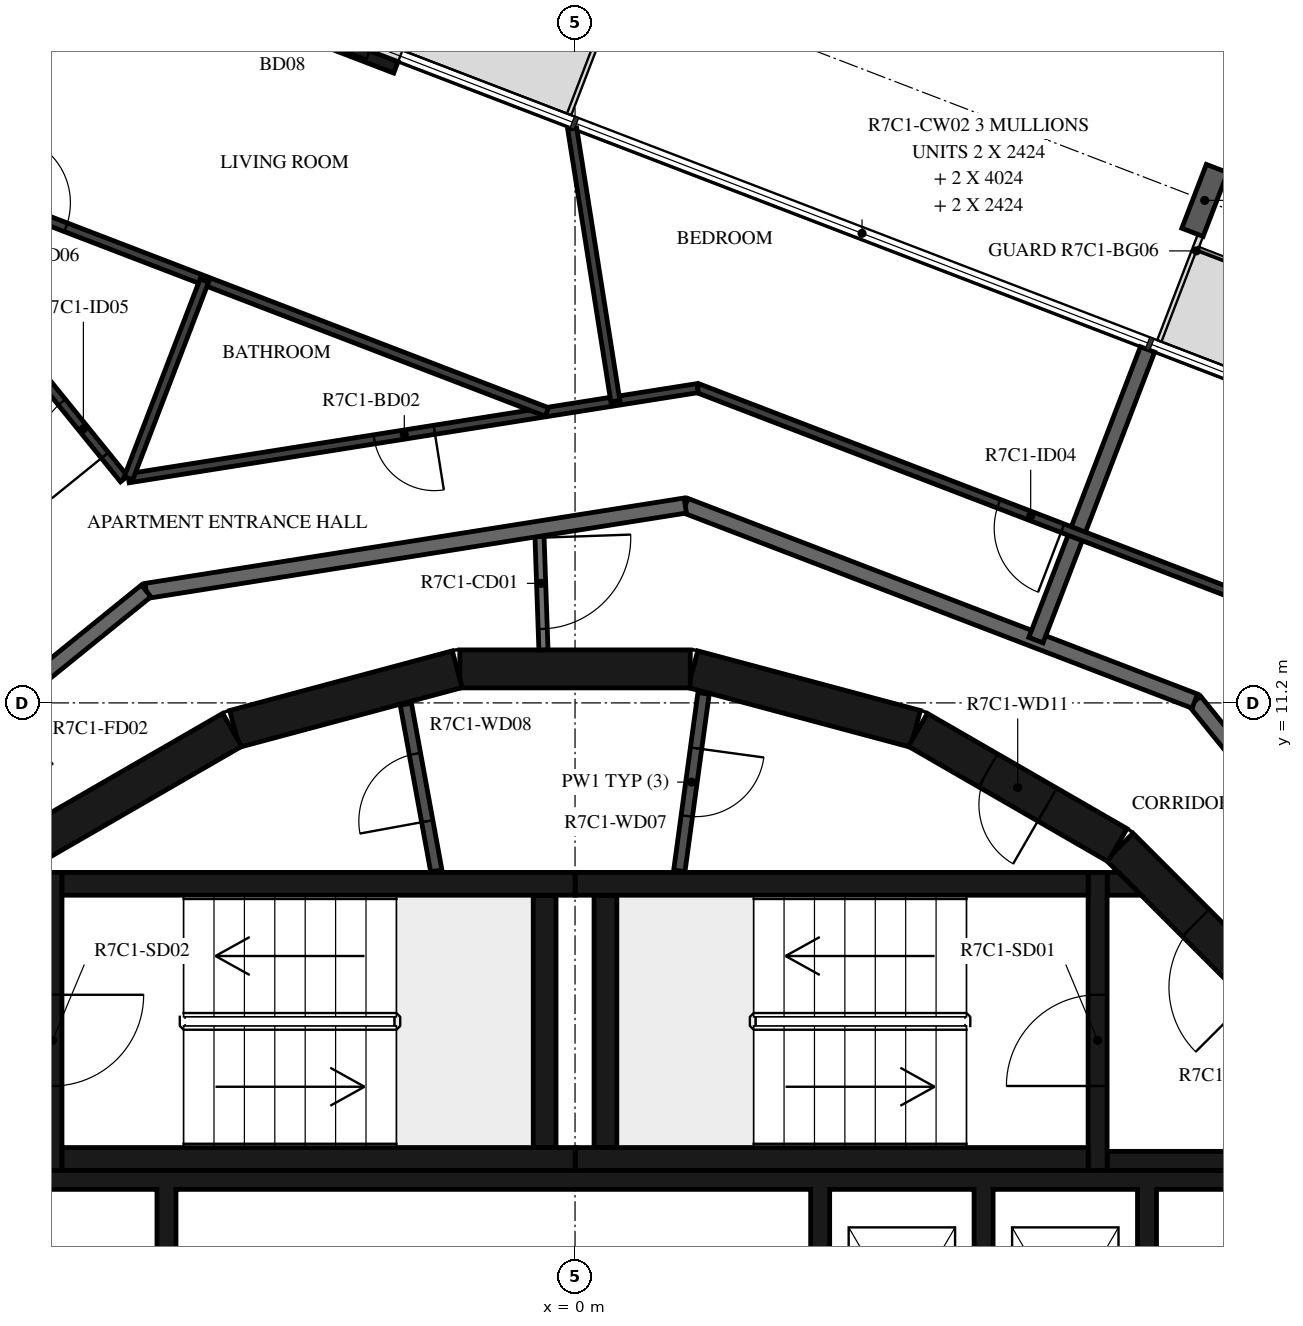
"""IFC4 building model, lengths in metres.
Left out: names, types, materials, properties, quantities, classifications, styles, units other than length and angle.
Written with IfcOpenShell. Run it as: python <this file> out.ifc"""

import sys

from ifc_helpers import new_model, si_unit, direction, frame, frame_2d, origin, origin_2d, place, context, subcontext, project, spatial, polyline, rectangle, i_section, outline, extrude, element, fill, save


model = new_model("IFC4")
c1 = context("Model", 3, precision=1e-05, world=origin(), true_north=direction((0.0, 1.0)))
c2 = subcontext(c1, "Body", "Model", "MODEL_VIEW")
j1 = project(units=[si_unit("LENGTHUNIT", "METRE"), si_unit("PLANEANGLEUNIT", "RADIAN")], contexts=[c1])
p1 = place(None, origin())
s1 = spatial("IfcSite", under=j1, at=p1, CompositionType="ELEMENT")
p2 = place(p1, origin())
s2 = spatial("IfcBuilding", under=s1, at=p2, CompositionType="ELEMENT")
p3 = place(p2, frame((0.0, 0.0, 287.9)))
s3 = spatial("IfcBuildingStorey", under=s2, at=p3, CompositionType="ELEMENT", Elevation=287.9)
p4 = place(p3, frame((8.284, 17.811, -0.38), z_axis=(0.0, 0.0, 1.0), x_axis=(0.933580354843, -0.35836813621, 0.0)))
e1 = element("IfcColumn", 1, at=p4, inside=s3, PredefinedType="COLUMN", context=c2, shape_type="SweptSolid", body=[
    extrude(i_section(OverallWidth=0.3, OverallDepth=0.9, WebThickness=0.019, FlangeThickness=0.035, FilletRadius=0.03, at=origin_2d()), origin(), (0.0, 0.0, 1.0), 2.616),
])
p5 = place(p3, frame((-2.357, 19.56, 0.0), z_axis=(0.0, 0.0, 1.0), x_axis=(-0.933553885508, 0.358437083534, 0.0)))
e2 = element("IfcWall", 2, at=p5, inside=s3, PredefinedType="STANDARD", context=c2, shape_type="SweptSolid", body=[
    extrude(rectangle(XDim=3.2, YDim=0.16, at=frame_2d((1.6, 0.0))), origin(), (0.0, 0.0, 1.0), 3.05),
])
p6 = place(p5, frame((0.4, 0.0, 0.0)))
e3 = element("IfcOpeningElement", 3, at=p6, cuts=e2, PredefinedType="OPENING", context=c2, shape_type="SweptSolid", body=[
    extrude(rectangle(XDim=2.4, YDim=2.4, at=frame_2d((1.2, 1.2))), frame((0.0, 0.09, 0.0), z_axis=(0.0, -1.0, 0.0), x_axis=(1.0, 0.0, 0.0)), (0.0, 0.0, 1.0), 0.18),
])
p7 = place(p3, frame((9.308, 7.164, 0.0), z_axis=(0.0, 0.0, 1.0), x_axis=(-0.707106781187, 0.707106781187, 0.0)))
e4 = element("IfcWall", 4, at=p7, inside=s3, PredefinedType="SHEAR", context=c2, shape_type="SweptSolid", body=[
    extrude(rectangle(XDim=3.032, YDim=0.5, at=frame_2d((1.516, 0.0))), origin(), (0.0, 0.0, 1.0), 3.05),
])
p8 = place(p7, frame((0.416, 0.0, 0.0)))
e5 = element("IfcOpeningElement", 5, at=p8, cuts=e4, PredefinedType="OPENING", context=c2, shape_type="SweptSolid", body=[
    extrude(rectangle(XDim=1.2, YDim=2.1, at=frame_2d((0.6, 1.05))), frame((0.0, 0.26, 0.0), z_axis=(0.0, -1.0, 0.0), x_axis=(1.0, 0.0, 0.0)), (0.0, 0.0, 1.0), 0.52),
])
p9 = place(p3, frame((7.137, 9.329, 0.0), z_axis=(0.0, 0.0, 1.0), x_axis=(-0.865975092491, 0.500087131594, 0.0)))
e6 = element("IfcWall", 6, at=p9, inside=s3, PredefinedType="SHEAR", context=c2, shape_type="SweptSolid", body=[
    extrude(rectangle(XDim=3.033, YDim=0.5, at=frame_2d((1.516, 0.0))), origin(), (0.0, 0.0, 1.0), 3.05),
])
p10 = place(p9, frame((1.066, 0.0, 0.0)))
e7 = element("IfcOpeningElement", 7, at=p10, cuts=e6, PredefinedType="OPENING", context=c2, shape_type="SweptSolid", body=[
    extrude(rectangle(XDim=0.9, YDim=2.1, at=frame_2d((0.45, 1.05))), frame((0.0, 0.26, 0.0), z_axis=(0.0, -1.0, 0.0), x_axis=(1.0, 0.0, 0.0)), (0.0, 0.0, 1.0), 0.52),
])
for number, where, z_axis, x_axis in (
    (8, (4.479, 10.858, 0.0), (0.0, 0.0, 1.0), (-0.966, 0.259, 0.0)),
    (9, (1.516, 11.647, 0.0), (0.0, 0.0, 1.0), (-1.0, 0.0, 0.0)),
    (10, (-1.55, 11.643, 0.0), (0.0, 0.0, 1.0), (-0.966, -0.259, 0.0)),
    (11, (-4.51, 10.845, 0.0), (0.0, 0.0, 1.0), (-0.866, -0.5, 0.0)),
):
    element("IfcWall", number, at=place(p3, frame(where, z_axis=z_axis, x_axis=x_axis)), inside=s3, PredefinedType="SHEAR", context=c2, shape_type="SweptSolid", body=[
        extrude(rectangle(XDim=3.033, YDim=0.5, at=frame_2d((1.516, 0.0))), origin(), (0.0, 0.0, 1.0), 3.05),
    ])
for number, where, z_axis, x_axis in (
    (12, (0.0, 5.2, 0.0), (0.0, 0.0, 1.0), (1.0, 0.0, 0.0)),
    (13, (0.0, 8.82, 0.0), (0.0, 0.0, 1.0), (1.0, 0.0, 0.0)),
):
    element("IfcWall", number, at=place(p3, frame(where, z_axis=z_axis, x_axis=x_axis)), inside=s3, PredefinedType="SHEAR", context=c2, shape_type="SweptSolid", body=[
        extrude(rectangle(XDim=6.75, YDim=0.3, at=frame_2d((3.375, 0.0))), origin(), (0.0, 0.0, 1.0), 3.05),
    ])
p11 = place(p3, frame((0.4, 5.35, 0.0), z_axis=(0.0, 0.0, 1.0), x_axis=(0.0, 1.0, 0.0)))
e14 = element("IfcWall", 14, at=p11, inside=s3, PredefinedType="SHEAR", context=c2, shape_type="SweptSolid", body=[
    extrude(rectangle(XDim=3.32, YDim=0.3, at=frame_2d((1.66, 0.0))), origin(), (0.0, 0.0, 1.0), 3.05),
])
p12 = place(p3, frame((6.875, 5.05, 0.0), z_axis=(0.0, 0.0, 1.0), x_axis=(0.0, 1.0, 0.0)))
e15 = element("IfcWall", 15, at=p12, inside=s3, PredefinedType="SHEAR", context=c2, shape_type="SweptSolid", body=[
    extrude(rectangle(XDim=3.92, YDim=0.25, at=frame_2d((1.96, 0.0))), origin(), (0.0, 0.0, 1.0), 3.05),
])
p13 = place(p12, frame((1.11, 0.0, 0.0)))
e16 = element("IfcOpeningElement", 16, at=p13, cuts=e15, PredefinedType="OPENING", context=c2, shape_type="SweptSolid", body=[
    extrude(rectangle(XDim=1.2, YDim=2.1, at=frame_2d((0.6, 1.05))), frame((0.0, 0.135, 0.0), z_axis=(0.0, -1.0, 0.0), x_axis=(1.0, 0.0, 0.0)), (0.0, 0.0, 1.0), 0.27),
])
p14 = place(p3, frame((7.0, 5.175, 0.0), z_axis=(0.0, 0.0, 1.0), x_axis=(1.0, 0.0, 0.0)))
e17 = element("IfcWall", 17, at=p14, inside=s3, PredefinedType="SHEAR", context=c2, shape_type="SweptSolid", body=[
    extrude(rectangle(XDim=3.1, YDim=0.25, at=frame_2d((1.55, 0.0))), origin(), (0.0, 0.0, 1.0), 3.05),
])
p15 = place(p3, origin())
e18 = element("IfcWall", 18, at=p15, inside=s3, PredefinedType="SHEAR", context=c2, shape_type="SweptSolid", body=[
    extrude(outline(polyline([(7.448, 8.67), (7.0, 8.67), (7.0, 8.97), (7.148, 8.97), (7.448, 8.67)])), origin(), (0.0, 0.0, 1.0), 3.05),
])
for number, where, z_axis, x_axis in (
    (19, (-6.75, 5.2, 0.0), (0.0, 0.0, 1.0), (1.0, 0.0, 0.0)),
    (20, (-6.75, 8.82, 0.0), (0.0, 0.0, 1.0), (1.0, 0.0, 0.0)),
):
    element("IfcWall", number, at=place(p3, frame(where, z_axis=z_axis, x_axis=x_axis)), inside=s3, PredefinedType="SHEAR", context=c2, shape_type="SweptSolid", body=[
        extrude(rectangle(XDim=6.75, YDim=0.3, at=frame_2d((3.375, 0.0))), origin(), (0.0, 0.0, 1.0), 3.05),
    ])
p16 = place(p3, frame((-0.4, 5.35, 0.0), z_axis=(0.0, 0.0, 1.0), x_axis=(0.0, 1.0, 0.0)))
e21 = element("IfcWall", 21, at=p16, inside=s3, PredefinedType="SHEAR", context=c2, shape_type="SweptSolid", body=[
    extrude(rectangle(XDim=3.32, YDim=0.3, at=frame_2d((1.66, 0.0))), origin(), (0.0, 0.0, 1.0), 3.05),
])
p17 = place(p3, frame((-6.875, 8.97, 0.0), z_axis=(0.0, 0.0, 1.0), x_axis=(0.0, -1.0, 0.0)))
e22 = element("IfcWall", 22, at=p17, inside=s3, PredefinedType="SHEAR", context=c2, shape_type="SweptSolid", body=[
    extrude(rectangle(XDim=3.92, YDim=0.25, at=frame_2d((1.96, 0.0))), origin(), (0.0, 0.0, 1.0), 3.05),
])
p18 = place(p17, frame((1.61, 0.0, 0.0)))
e23 = element("IfcOpeningElement", 23, at=p18, cuts=e22, PredefinedType="OPENING", context=c2, shape_type="SweptSolid", body=[
    extrude(rectangle(XDim=1.2, YDim=2.1, at=frame_2d((0.6, 1.05))), frame((0.0, 0.135, 0.0), z_axis=(0.0, -1.0, 0.0), x_axis=(1.0, 0.0, 0.0)), (0.0, 0.0, 1.0), 0.27),
])
p19 = place(p3, origin())
e24 = element("IfcWall", 24, at=p19, inside=s3, PredefinedType="SHEAR", context=c2, shape_type="SweptSolid", body=[
    extrude(outline(polyline([(-9.8, 1.9), (-9.55, 1.9), (-9.55, 4.8), (-5.5, 4.8), (-5.5, 1.9), (-5.25, 1.9), (-5.25, 4.8), (3.1, 4.8), (3.1, 1.9), (3.35, 1.9), (3.35, 4.8), (5.25, 4.8), (5.25, 1.9), (5.5, 1.9), (5.5, 4.8), (7.4, 4.8), (7.4, 1.9), (7.65, 1.9), (7.65, 4.8), (9.55, 4.8), (9.55, 1.9), (9.8, 1.9), (9.8, 4.8), (9.8, 5.05), (-9.8, 5.05), (-9.8, 4.8), (-9.8, 1.9)])), origin(), (0.0, 0.0, 1.0), 3.05),
])
p20 = place(p3, frame((1.691, 11.326, 0.0), z_axis=(0.0, 0.0, 1.0), x_axis=(-0.135344253201, -0.990798633994, 0.0)))
e25 = element("IfcWall", 25, at=p20, inside=s3, PredefinedType="PARTITIONING", context=c2, shape_type="SweptSolid", body=[
    extrude(rectangle(XDim=2.358, YDim=0.15, at=frame_2d((1.179, 0.0))), origin(), (0.0, 0.0, 1.0), 3.05),
])
p21 = place(p20, frame((0.729, 0.0, 0.0)))
e26 = element("IfcOpeningElement", 26, at=p21, cuts=e25, PredefinedType="OPENING", context=c2, shape_type="SweptSolid", body=[
    extrude(rectangle(XDim=0.9, YDim=2.1, at=frame_2d((0.45, 1.05))), frame((0.0, 0.085, 0.0), z_axis=(0.0, -1.0, 0.0), x_axis=(1.0, 0.0, 0.0)), (0.0, 0.0, 1.0), 0.17),
])
p22 = place(p3, frame((-1.825, 8.99, 0.0), z_axis=(0.0, 0.0, 1.0), x_axis=(-0.179955206115, 0.983674805915, 0.0)))
e27 = element("IfcWall", 27, at=p22, inside=s3, PredefinedType="PARTITIONING", context=c2, shape_type="SweptSolid", body=[
    extrude(rectangle(XDim=2.229, YDim=0.15, at=frame_2d((1.115, 0.0))), origin(), (0.0, 0.0, 1.0), 3.05),
])
p23 = place(p22, frame((0.665, 0.0, 0.0)))
e28 = element("IfcOpeningElement", 28, at=p23, cuts=e27, PredefinedType="OPENING", context=c2, shape_type="SweptSolid", body=[
    extrude(rectangle(XDim=0.9, YDim=2.1, at=frame_2d((0.45, 1.05))), frame((0.0, 0.085, 0.0), z_axis=(0.0, -1.0, 0.0), x_axis=(1.0, 0.0, 0.0)), (0.0, 0.0, 1.0), 0.17),
])
p24 = place(p3, frame((-0.471, 13.492, 0.0), z_axis=(0.0, 0.0, 1.0), x_axis=(0.034873173869, -0.999391745886, 0.0)))
e29 = element("IfcWall", 29, at=p24, inside=s3, PredefinedType="PARTITIONING", context=c2, shape_type="SweptSolid", body=[
    extrude(rectangle(XDim=1.596, YDim=0.12, at=frame_2d((0.798, 0.0))), origin(), (0.0, 0.0, 1.0), 3.05),
])
p25 = place(p24, frame((0.12, 0.0, 0.0)))
e30 = element("IfcOpeningElement", 30, at=p25, cuts=e29, PredefinedType="OPENING", context=c2, shape_type="SweptSolid", body=[
    extrude(rectangle(XDim=1.2, YDim=2.1, at=frame_2d((0.6, 1.05))), frame((0.0, 0.07, 0.0), z_axis=(0.0, -1.0, 0.0), x_axis=(1.0, 0.0, 0.0)), (0.0, 0.0, 1.0), 0.14),
])
p26 = place(p3, frame((12.673, 5.643, 0.0), z_axis=(0.0, 0.0, 1.0), x_axis=(-0.629302871585, 0.777160148113, 0.0)))
e31 = element("IfcWall", 31, at=p26, inside=s3, PredefinedType="STANDARD", context=c2, shape_type="SweptSolid", body=[
    extrude(rectangle(XDim=7.181, YDim=0.2, at=frame_2d((3.59, 0.0))), origin(), (0.0, 0.0, 1.0), 3.05),
])
p27 = place(p26, frame((4.1, 0.0, 0.0)))
e32 = element("IfcOpeningElement", 32, at=p27, cuts=e31, PredefinedType="OPENING", context=c2, shape_type="SweptSolid", body=[
    extrude(rectangle(XDim=1.0, YDim=2.1, at=frame_2d((0.5, 1.05))), frame((0.0, 0.11, 0.0), z_axis=(0.0, -1.0, 0.0), x_axis=(1.0, 0.0, 0.0)), (0.0, 0.0, 1.0), 0.22),
])
p28 = place(p3, frame((8.154, 11.223, 0.0), z_axis=(0.0, 0.0, 1.0), x_axis=(-0.93359073609, 0.358341090983, 0.0)))
e33 = element("IfcWall", 33, at=p28, inside=s3, PredefinedType="STANDARD", context=c2, shape_type="SweptSolid", body=[
    extrude(rectangle(XDim=7.181, YDim=0.2, at=frame_2d((3.59, 0.0))), origin(), (0.0, 0.0, 1.0), 3.05),
])
p29 = place(p3, frame((1.45, 13.797, 0.0), z_axis=(0.0, 0.0, 1.0), x_axis=(-0.987690361611, -0.156421704315, 0.0)))
e34 = element("IfcWall", 34, at=p29, inside=s3, PredefinedType="STANDARD", context=c2, shape_type="SweptSolid", body=[
    extrude(rectangle(XDim=7.181, YDim=0.2, at=frame_2d((3.591, 0.0))), origin(), (0.0, 0.0, 1.0), 3.05),
])
p30 = place(p3, frame((-5.643, 12.673, 0.0), z_axis=(0.0, 0.0, 1.0), x_axis=(-0.777160148113, -0.629302871585, 0.0)))
e35 = element("IfcWall", 35, at=p30, inside=s3, PredefinedType="STANDARD", context=c2, shape_type="SweptSolid", body=[
    extrude(rectangle(XDim=7.181, YDim=0.2, at=frame_2d((3.59, 0.0))), origin(), (0.0, 0.0, 1.0), 3.05),
])
p31 = place(p30, frame((2.39, 0.0, 0.0)))
e36 = element("IfcOpeningElement", 36, at=p31, cuts=e35, PredefinedType="OPENING", context=c2, shape_type="SweptSolid", body=[
    extrude(rectangle(XDim=1.0, YDim=2.1, at=frame_2d((0.5, 1.05))), frame((0.0, 0.11, 0.0), z_axis=(0.0, -1.0, 0.0), x_axis=(1.0, 0.0, 0.0)), (0.0, 0.0, 1.0), 0.22),
])
p32 = place(p30, frame((5.19, 0.0, 0.0)))
e37 = element("IfcOpeningElement", 37, at=p32, cuts=e35, PredefinedType="OPENING", context=c2, shape_type="SweptSolid", body=[
    extrude(rectangle(XDim=1.0, YDim=2.1, at=frame_2d((0.5, 1.05))), frame((0.0, 0.11, 0.0), z_axis=(0.0, -1.0, 0.0), x_axis=(1.0, 0.0, 0.0)), (0.0, 0.0, 1.0), 0.22),
])
p33 = place(p3, frame((7.532, 15.85, 0.0), z_axis=(0.0, 0.0, 1.0), x_axis=(-0.358355996975, -0.933585014571, 0.0)))
e38 = element("IfcWall", 38, at=p33, inside=s3, PredefinedType="STANDARD", context=c2, shape_type="SweptSolid", body=[
    extrude(rectangle(XDim=4.096, YDim=0.2, at=frame_2d((2.048, 0.0))), origin(), (0.0, 0.0, 1.0), 3.05),
])
p34 = place(p3, frame((9.067, 12.479, 0.0), z_axis=(0.0, 0.0, 1.0), x_axis=(-0.933579449035, 0.358370495911, 0.0)))
e39 = element("IfcWall", 39, at=p34, inside=s3, PredefinedType="PARTITIONING", context=c2, shape_type="SweptSolid", body=[
    extrude(rectangle(XDim=7.985, YDim=0.12, at=frame_2d((3.992, 0.0))), origin(), (0.0, 0.0, 1.0), 3.05),
])
p35 = place(p34, frame((2.841, 0.0, 0.0)))
e40 = element("IfcOpeningElement", 40, at=p35, cuts=e39, PredefinedType="OPENING", context=c2, shape_type="SweptSolid", body=[
    extrude(rectangle(XDim=0.9, YDim=2.1, at=frame_2d((0.45, 1.05))), frame((0.0, 0.07, 0.0), z_axis=(0.0, -1.0, 0.0), x_axis=(1.0, 0.0, 0.0)), (0.0, 0.0, 1.0), 0.14),
])
p36 = place(p3, frame((1.612, 15.341, 0.0), z_axis=(0.0, 0.0, 1.0), x_axis=(-0.987690790621, -0.156418995404, 0.0)))
e41 = element("IfcWall", 41, at=p36, inside=s3, PredefinedType="PARTITIONING", context=c2, shape_type="SweptSolid", body=[
    extrude(rectangle(XDim=7.581, YDim=0.12, at=frame_2d((3.791, 0.0))), origin(), (0.0, 0.0, 1.0), 3.05),
])
p37 = place(p36, frame((3.507, 0.0, 0.0)))
e42 = element("IfcOpeningElement", 42, at=p37, cuts=e41, PredefinedType="OPENING", context=c2, shape_type="SweptSolid", body=[
    extrude(rectangle(XDim=0.8, YDim=2.1, at=frame_2d((0.4, 1.05))), frame((0.0, 0.07, 0.0), z_axis=(0.0, -1.0, 0.0), x_axis=(1.0, 0.0, 0.0)), (0.0, 0.0, 1.0), 0.14),
])
p38 = place(p3, frame((-5.933, 14.146, 0.0), z_axis=(0.0, 0.0, 1.0), x_axis=(-0.62930727886, 0.777156579316, 0.0)))
e43 = element("IfcWall", 43, at=p38, inside=s3, PredefinedType="PARTITIONING", context=c2, shape_type="SweptSolid", body=[
    extrude(rectangle(XDim=2.833, YDim=0.12, at=frame_2d((1.417, 0.0))), origin(), (0.0, 0.0, 1.0), 3.05),
])
p39 = place(p38, frame((0.4, 0.0, 0.0)))
e44 = element("IfcOpeningElement", 44, at=p39, cuts=e43, PredefinedType="OPENING", context=c2, shape_type="SweptSolid", body=[
    extrude(rectangle(XDim=0.9, YDim=2.1, at=frame_2d((0.45, 1.05))), frame((0.0, 0.07, 0.0), z_axis=(0.0, -1.0, 0.0), x_axis=(1.0, 0.0, 0.0)), (0.0, 0.0, 1.0), 0.14),
])
p40 = place(p3, frame((-0.037, 18.756, 0.0), z_axis=(0.0, 0.0, 1.0), x_axis=(0.156421851095, -0.987690338365, 0.0)))
e45 = element("IfcWall", 45, at=p40, inside=s3, PredefinedType="PARTITIONING", context=c2, shape_type="SweptSolid", body=[
    extrude(rectangle(XDim=3.63, YDim=0.12, at=frame_2d((1.815, 0.0))), origin(), (0.0, 0.0, 1.0), 3.05),
])
p41 = place(p3, frame((-10.18, 18.793, 0.0), z_axis=(0.0, 0.0, 1.0), x_axis=(0.933574148929, -0.358384302742, 0.0)))
e46 = element("IfcWall", 46, at=p41, inside=s3, PredefinedType="PARTITIONING", context=c2, shape_type="SweptSolid", body=[
    extrude(rectangle(XDim=10.509, YDim=0.12, at=frame_2d((5.254, 0.0))), origin(), (0.0, 0.0, 1.0), 3.05),
])
p42 = place(p41, frame((2.829, 0.0, 0.0)))
e47 = element("IfcOpeningElement", 47, at=p42, cuts=e46, PredefinedType="OPENING", context=c2, shape_type="SweptSolid", body=[
    extrude(rectangle(XDim=0.9, YDim=2.1, at=frame_2d((0.45, 1.05))), frame((0.0, 0.07, 0.0), z_axis=(0.0, -1.0, 0.0), x_axis=(1.0, 0.0, 0.0)), (0.0, 0.0, 1.0), 0.14),
])
p43 = place(p3, frame((-4.876, 16.757, 0.0), z_axis=(0.0, 0.0, 1.0), x_axis=(-0.358380240487, -0.933575708354, 0.0)))
e48 = element("IfcWall", 48, at=p43, inside=s3, PredefinedType="PARTITIONING", context=c2, shape_type="SweptSolid", body=[
    extrude(rectangle(XDim=2.787, YDim=0.12, at=frame_2d((1.394, 0.0))), origin(), (0.0, 0.0, 1.0), 3.05),
])
p44 = place(p6, origin())
e49 = element("IfcDoor", 49, at=p44, inside=s3, OperationType="DOUBLE_DOOR_SLIDING", PredefinedType="DOOR", context=c2, shape_type="SweptSolid", body=[
    extrude(rectangle(XDim=2.4, YDim=2.4, at=frame_2d((1.2, 1.2))), frame((0.0, 0.025, 0.0), z_axis=(0.0, -1.0, 0.0), x_axis=(1.0, 0.0, 0.0)), (0.0, 0.0, 1.0), 0.05),
])
fill(e3, e49)
p45 = place(p13, origin())
e50 = element("IfcDoor", 50, at=p45, inside=s3, OperationType="SINGLE_SWING_LEFT", PredefinedType="DOOR", context=c2, shape_type="SweptSolid", body=[
    extrude(rectangle(XDim=1.2, YDim=2.1, at=frame_2d((0.6, 1.05))), frame((0.0, 0.025, 0.0), z_axis=(0.0, -1.0, 0.0), x_axis=(1.0, 0.0, 0.0)), (0.0, 0.0, 1.0), 0.05),
])
fill(e16, e50)
p46 = place(p8, origin())
e51 = element("IfcDoor", 51, at=p46, inside=s3, OperationType="SINGLE_SWING_RIGHT", PredefinedType="DOOR", context=c2, shape_type="SweptSolid", body=[
    extrude(rectangle(XDim=1.2, YDim=2.1, at=frame_2d((0.6, 1.05))), frame((0.0, 0.025, 0.0), z_axis=(0.0, -1.0, 0.0), x_axis=(1.0, 0.0, 0.0)), (0.0, 0.0, 1.0), 0.05),
])
fill(e5, e51)
p47 = place(p18, origin())
e52 = element("IfcDoor", 52, at=p47, inside=s3, OperationType="SINGLE_SWING_LEFT", PredefinedType="DOOR", context=c2, shape_type="SweptSolid", body=[
    extrude(rectangle(XDim=1.2, YDim=2.1, at=frame_2d((0.6, 1.05))), frame((0.0, 0.025, 0.0), z_axis=(0.0, -1.0, 0.0), x_axis=(1.0, 0.0, 0.0)), (0.0, 0.0, 1.0), 0.05),
])
fill(e23, e52)
p48 = place(p21, origin())
e53 = element("IfcDoor", 53, at=p48, inside=s3, OperationType="SINGLE_SWING_LEFT", PredefinedType="DOOR", context=c2, shape_type="SweptSolid", body=[
    extrude(rectangle(XDim=0.9, YDim=2.1, at=frame_2d((0.45, 1.05))), frame((0.0, 0.025, 0.0), z_axis=(0.0, -1.0, 0.0), x_axis=(1.0, 0.0, 0.0)), (0.0, 0.0, 1.0), 0.05),
])
fill(e26, e53)
p49 = place(p23, origin())
e54 = element("IfcDoor", 54, at=p49, inside=s3, OperationType="SINGLE_SWING_RIGHT", PredefinedType="DOOR", context=c2, shape_type="SweptSolid", body=[
    extrude(rectangle(XDim=0.9, YDim=2.1, at=frame_2d((0.45, 1.05))), frame((0.0, 0.025, 0.0), z_axis=(0.0, -1.0, 0.0), x_axis=(1.0, 0.0, 0.0)), (0.0, 0.0, 1.0), 0.05),
])
fill(e28, e54)
p50 = place(p10, origin())
e55 = element("IfcDoor", 55, at=p50, inside=s3, OperationType="SINGLE_SWING_LEFT", PredefinedType="DOOR", context=c2, shape_type="SweptSolid", body=[
    extrude(rectangle(XDim=0.9, YDim=2.1, at=frame_2d((0.45, 1.05))), frame((0.0, 0.025, 0.0), z_axis=(0.0, -1.0, 0.0), x_axis=(1.0, 0.0, 0.0)), (0.0, 0.0, 1.0), 0.05),
])
fill(e7, e55)
p51 = place(p35, origin())
e56 = element("IfcDoor", 56, at=p51, inside=s3, OperationType="SINGLE_SWING_LEFT", PredefinedType="DOOR", context=c2, shape_type="SweptSolid", body=[
    extrude(rectangle(XDim=0.9, YDim=2.1, at=frame_2d((0.45, 1.05))), frame((0.0, 0.025, 0.0), z_axis=(0.0, -1.0, 0.0), x_axis=(1.0, 0.0, 0.0)), (0.0, 0.0, 1.0), 0.05),
])
fill(e40, e56)
p52 = place(p37, origin())
e57 = element("IfcDoor", 57, at=p52, inside=s3, OperationType="SINGLE_SWING_RIGHT", PredefinedType="DOOR", context=c2, shape_type="SweptSolid", body=[
    extrude(rectangle(XDim=0.8, YDim=2.1, at=frame_2d((0.4, 1.05))), frame((0.0, 0.025, 0.0), z_axis=(0.0, -1.0, 0.0), x_axis=(1.0, 0.0, 0.0)), (0.0, 0.0, 1.0), 0.05),
])
fill(e42, e57)
p53 = place(p39, origin())
e58 = element("IfcDoor", 58, at=p53, inside=s3, OperationType="SINGLE_SWING_RIGHT", PredefinedType="DOOR", context=c2, shape_type="SweptSolid", body=[
    extrude(rectangle(XDim=0.9, YDim=2.1, at=frame_2d((0.45, 1.05))), frame((0.0, 0.025, 0.0), z_axis=(0.0, -1.0, 0.0), x_axis=(1.0, 0.0, 0.0)), (0.0, 0.0, 1.0), 0.05),
])
fill(e44, e58)
p54 = place(p42, origin())
e59 = element("IfcDoor", 59, at=p54, inside=s3, OperationType="SINGLE_SWING_RIGHT", PredefinedType="DOOR", context=c2, shape_type="SweptSolid", body=[
    extrude(rectangle(XDim=0.9, YDim=2.1, at=frame_2d((0.45, 1.05))), frame((0.0, 0.025, 0.0), z_axis=(0.0, -1.0, 0.0), x_axis=(1.0, 0.0, 0.0)), (0.0, 0.0, 1.0), 0.05),
])
fill(e47, e59)
p55 = place(p25, origin())
e60 = element("IfcDoor", 60, at=p55, inside=s3, OperationType="DOUBLE_DOOR_SINGLE_SWING", PredefinedType="DOOR", context=c2, shape_type="SweptSolid", body=[
    extrude(rectangle(XDim=1.2, YDim=2.1, at=frame_2d((0.6, 1.05))), frame((0.0, 0.025, 0.0), z_axis=(0.0, -1.0, 0.0), x_axis=(1.0, 0.0, 0.0)), (0.0, 0.0, 1.0), 0.05),
])
fill(e30, e60)
save(model, sys.argv[1])
